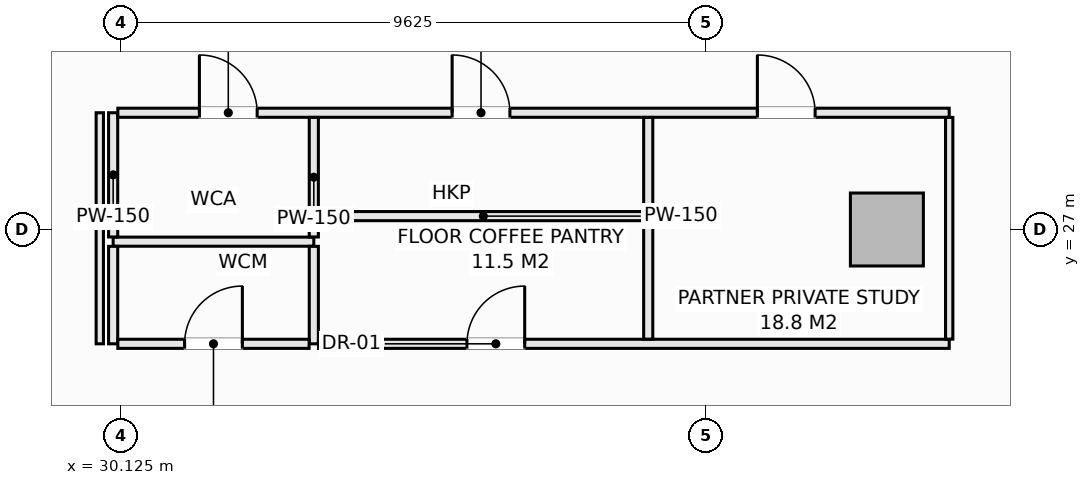
"""IFC4 building model, lengths in metres.
Left out: names, types, materials, properties, quantities, classifications, styles, units other than length and angle.
Written with IfcOpenShell. Run it as: python <this file> out.ifc"""

import sys

from ifc_helpers import new_model, si_unit, direction, frame, frame_2d, origin, origin_2d, place, context, subcontext, project, spatial, rectangle, extrude, element, fill, save


model = new_model("IFC4")
c1 = context("Model", 3, precision=1e-05, world=origin(), true_north=direction((0.0, 1.0)))
c2 = subcontext(c1, "Body", "Model", "MODEL_VIEW")
j1 = project(units=[si_unit("LENGTHUNIT", "METRE"), si_unit("PLANEANGLEUNIT", "RADIAN")], contexts=[c1])
p1 = place(None, origin())
s1 = spatial("IfcSite", under=j1, at=p1, CompositionType="ELEMENT")
p2 = place(p1, origin())
s2 = spatial("IfcBuilding", under=s1, at=p2, CompositionType="ELEMENT")
p3 = place(p2, frame((0.0, 0.0, 88.1)))
s3 = spatial("IfcBuildingStorey", under=s2, at=p3, CompositionType="ELEMENT", Elevation=88.1)
p4 = place(p3, frame((42.725, 27.0, -0.28), z_axis=(0.0, 0.0, 1.0), x_axis=(1.0, 0.0, 0.0)))
e1 = element("IfcColumn", 1, at=p4, inside=s3, PredefinedType="COLUMN", context=c2, shape_type="SweptSolid", body=[
    extrude(rectangle(XDim=1.2, YDim=1.2, at=origin_2d()), origin(), (0.0, 0.0, 1.0), 3.85),
])
p5 = place(p3, frame((30.0, 26.8, 0.0), z_axis=(0.0, 0.0, 1.0), x_axis=(1.0, 0.0, 0.0)))
e2 = element("IfcWall", 2, at=p5, inside=s3, PredefinedType="PARTITIONING", context=c2, shape_type="SweptSolid", body=[
    extrude(rectangle(XDim=3.3, YDim=0.15, at=frame_2d((1.65, 0.0))), origin(), (0.0, 0.0, 1.0), 3.57),
])
p6 = place(p3, frame((30.0, 25.12, 0.0), z_axis=(0.0, 0.0, 1.0), x_axis=(0.0, 1.0, 0.0)))
e3 = element("IfcWall", 3, at=p6, inside=s3, PredefinedType="PARTITIONING", context=c2, shape_type="SweptSolid", body=[
    extrude(rectangle(XDim=1.603, YDim=0.15, at=frame_2d((0.801, 0.0))), origin(), (0.0, 0.0, 1.0), 3.57),
])
p7 = place(p3, frame((30.0, 26.877, 0.0), z_axis=(0.0, 0.0, 1.0), x_axis=(0.0, 1.0, 0.0)))
e4 = element("IfcWall", 4, at=p7, inside=s3, PredefinedType="PARTITIONING", context=c2, shape_type="SweptSolid", body=[
    extrude(rectangle(XDim=2.043, YDim=0.15, at=frame_2d((1.021, 0.0))), origin(), (0.0, 0.0, 1.0), 3.57),
])
p8 = place(p3, frame((30.077, 28.92, 0.0), z_axis=(0.0, 0.0, 1.0), x_axis=(1.0, 0.0, 0.0)))
e5 = element("IfcWall", 5, at=p8, inside=s3, PredefinedType="PARTITIONING", context=c2, shape_type="SweptSolid", body=[
    extrude(rectangle(XDim=13.673, YDim=0.15, at=frame_2d((6.836, 0.0))), origin(), (0.0, 0.0, 1.0), 3.57),
])
p9 = place(p8, frame((1.342, 0.0, 0.0)))
e6 = element("IfcOpeningElement", 6, at=p9, cuts=e5, PredefinedType="OPENING", context=c2, shape_type="SweptSolid", body=[
    extrude(rectangle(XDim=0.95, YDim=2.1, at=frame_2d((0.475, 1.05))), frame((0.0, 0.085, 0.0), z_axis=(0.0, -1.0, 0.0), x_axis=(1.0, 0.0, 0.0)), (0.0, 0.0, 1.0), 0.17),
])
p10 = place(p8, frame((5.498, 0.0, 0.0)))
e7 = element("IfcOpeningElement", 7, at=p10, cuts=e5, PredefinedType="OPENING", context=c2, shape_type="SweptSolid", body=[
    extrude(rectangle(XDim=0.95, YDim=2.1, at=frame_2d((0.475, 1.05))), frame((0.0, 0.085, 0.0), z_axis=(0.0, -1.0, 0.0), x_axis=(1.0, 0.0, 0.0)), (0.0, 0.0, 1.0), 0.17),
])
p11 = place(p8, frame((10.518, 0.0, 0.0)))
e8 = element("IfcOpeningElement", 8, at=p11, cuts=e5, PredefinedType="OPENING", context=c2, shape_type="SweptSolid", body=[
    extrude(rectangle(XDim=0.95, YDim=2.1, at=frame_2d((0.475, 1.05))), frame((0.0, 0.085, 0.0), z_axis=(0.0, -1.0, 0.0), x_axis=(1.0, 0.0, 0.0)), (0.0, 0.0, 1.0), 0.17),
])
p12 = place(p3, frame((33.3, 25.12, 0.0), z_axis=(0.0, 0.0, 1.0), x_axis=(0.0, 1.0, 0.0)))
e9 = element("IfcWall", 9, at=p12, inside=s3, PredefinedType="PARTITIONING", context=c2, shape_type="SweptSolid", body=[
    extrude(rectangle(XDim=1.603, YDim=0.15, at=frame_2d((0.801, 0.0))), origin(), (0.0, 0.0, 1.0), 3.57),
])
p13 = place(p3, frame((33.3, 26.877, 0.0), z_axis=(0.0, 0.0, 1.0), x_axis=(0.0, 1.0, 0.0)))
e10 = element("IfcWall", 10, at=p13, inside=s3, PredefinedType="PARTITIONING", context=c2, shape_type="SweptSolid", body=[
    extrude(rectangle(XDim=1.966, YDim=0.15, at=frame_2d((0.983, 0.0))), origin(), (0.0, 0.0, 1.0), 3.57),
])
p14 = place(p3, frame((30.077, 25.12, 0.0), z_axis=(0.0, 0.0, 1.0), x_axis=(1.0, 0.0, 0.0)))
e11 = element("IfcWall", 11, at=p14, inside=s3, PredefinedType="PARTITIONING", context=c2, shape_type="SweptSolid", body=[
    extrude(rectangle(XDim=3.146, YDim=0.15, at=frame_2d((1.573, 0.0))), origin(), (0.0, 0.0, 1.0), 3.57),
])
p15 = place(p14, frame((1.098, 0.0, 0.0)))
e12 = element("IfcOpeningElement", 12, at=p15, cuts=e11, PredefinedType="OPENING", context=c2, shape_type="SweptSolid", body=[
    extrude(rectangle(XDim=0.95, YDim=2.1, at=frame_2d((0.475, 1.05))), frame((0.0, 0.085, 0.0), z_axis=(0.0, -1.0, 0.0), x_axis=(1.0, 0.0, 0.0)), (0.0, 0.0, 1.0), 0.17),
])
p16 = place(p3, frame((33.377, 25.12, 0.0), z_axis=(0.0, 0.0, 1.0), x_axis=(1.0, 0.0, 0.0)))
e13 = element("IfcWall", 13, at=p16, inside=s3, PredefinedType="PARTITIONING", context=c2, shape_type="SweptSolid", body=[
    extrude(rectangle(XDim=10.373, YDim=0.15, at=frame_2d((5.187, 0.0))), origin(), (0.0, 0.0, 1.0), 3.57),
])
p17 = place(p16, frame((2.441, 0.0, 0.0)))
e14 = element("IfcOpeningElement", 14, at=p17, cuts=e13, PredefinedType="OPENING", context=c2, shape_type="SweptSolid", body=[
    extrude(rectangle(XDim=0.95, YDim=2.1, at=frame_2d((0.475, 1.05))), frame((0.0, 0.085, 0.0), z_axis=(0.0, -1.0, 0.0), x_axis=(1.0, 0.0, 0.0)), (0.0, 0.0, 1.0), 0.17),
])
p18 = place(p3, frame((33.377, 27.22, 0.0), z_axis=(0.0, 0.0, 1.0), x_axis=(1.0, 0.0, 0.0)))
e15 = element("IfcWall", 15, at=p18, inside=s3, PredefinedType="PARTITIONING", context=c2, shape_type="SweptSolid", body=[
    extrude(rectangle(XDim=5.423, YDim=0.15, at=frame_2d((2.711, 0.0))), origin(), (0.0, 0.0, 1.0), 3.57),
])
p19 = place(p3, frame((38.8, 25.197, 0.0), z_axis=(0.0, 0.0, 1.0), x_axis=(0.0, 1.0, 0.0)))
e16 = element("IfcWall", 16, at=p19, inside=s3, PredefinedType="PARTITIONING", context=c2, shape_type="SweptSolid", body=[
    extrude(rectangle(XDim=1.946, YDim=0.15, at=frame_2d((0.973, 0.0))), origin(), (0.0, 0.0, 1.0), 3.57),
])
p20 = place(p3, frame((38.8, 27.297, 0.0), z_axis=(0.0, 0.0, 1.0), x_axis=(0.0, 1.0, 0.0)))
e17 = element("IfcWall", 17, at=p20, inside=s3, PredefinedType="PARTITIONING", context=c2, shape_type="SweptSolid", body=[
    extrude(rectangle(XDim=1.546, YDim=0.15, at=frame_2d((0.773, 0.0))), origin(), (0.0, 0.0, 1.0), 3.57),
])
p21 = place(p3, frame((29.78, 25.12, 0.0), z_axis=(0.0, 0.0, 1.0), x_axis=(0.0, 1.0, 0.0)))
e18 = element("IfcWall", 18, at=p21, inside=s3, PredefinedType="PARTITIONING", context=c2, shape_type="SweptSolid", body=[
    extrude(rectangle(XDim=3.8, YDim=0.12, at=frame_2d((1.9, 0.0))), origin(), (0.0, 0.0, 1.0), 3.57),
])
p22 = place(p3, frame((43.75, 25.197, 0.0), z_axis=(0.0, 0.0, 1.0), x_axis=(0.0, 1.0, 0.0)))
e19 = element("IfcWall", 19, at=p22, inside=s3, PredefinedType="PARTITIONING", context=c2, shape_type="SweptSolid", body=[
    extrude(rectangle(XDim=3.646, YDim=0.12, at=frame_2d((1.823, 0.0))), origin(), (0.0, 0.0, 1.0), 3.57),
])
p23 = place(p9, origin())
e20 = element("IfcDoor", 20, at=p23, inside=s3, OperationType="SINGLE_SWING_LEFT", PredefinedType="DOOR", context=c2, shape_type="SweptSolid", body=[
    extrude(rectangle(XDim=0.95, YDim=2.1, at=frame_2d((0.475, 1.05))), frame((0.0, 0.025, 0.0), z_axis=(0.0, -1.0, 0.0), x_axis=(1.0, 0.0, 0.0)), (0.0, 0.0, 1.0), 0.05),
])
fill(e6, e20)
p24 = place(p15, origin())
e21 = element("IfcDoor", 21, at=p24, inside=s3, OperationType="SINGLE_SWING_RIGHT", PredefinedType="DOOR", context=c2, shape_type="SweptSolid", body=[
    extrude(rectangle(XDim=0.95, YDim=2.1, at=frame_2d((0.475, 1.05))), frame((0.0, 0.025, 0.0), z_axis=(0.0, -1.0, 0.0), x_axis=(1.0, 0.0, 0.0)), (0.0, 0.0, 1.0), 0.05),
])
fill(e12, e21)
p25 = place(p10, origin())
e22 = element("IfcDoor", 22, at=p25, inside=s3, OperationType="SINGLE_SWING_LEFT", PredefinedType="DOOR", context=c2, shape_type="SweptSolid", body=[
    extrude(rectangle(XDim=0.95, YDim=2.1, at=frame_2d((0.475, 1.05))), frame((0.0, 0.025, 0.0), z_axis=(0.0, -1.0, 0.0), x_axis=(1.0, 0.0, 0.0)), (0.0, 0.0, 1.0), 0.05),
])
fill(e7, e22)
p26 = place(p17, origin())
e23 = element("IfcDoor", 23, at=p26, inside=s3, OperationType="SINGLE_SWING_RIGHT", PredefinedType="DOOR", context=c2, shape_type="SweptSolid", body=[
    extrude(rectangle(XDim=0.95, YDim=2.1, at=frame_2d((0.475, 1.05))), frame((0.0, 0.025, 0.0), z_axis=(0.0, -1.0, 0.0), x_axis=(1.0, 0.0, 0.0)), (0.0, 0.0, 1.0), 0.05),
])
fill(e14, e23)
p27 = place(p11, origin())
e24 = element("IfcDoor", 24, at=p27, inside=s3, OperationType="SINGLE_SWING_LEFT", PredefinedType="DOOR", context=c2, shape_type="SweptSolid", body=[
    extrude(rectangle(XDim=0.95, YDim=2.1, at=frame_2d((0.475, 1.05))), frame((0.0, 0.025, 0.0), z_axis=(0.0, -1.0, 0.0), x_axis=(1.0, 0.0, 0.0)), (0.0, 0.0, 1.0), 0.05),
])
fill(e8, e24)
save(model, sys.argv[1])
